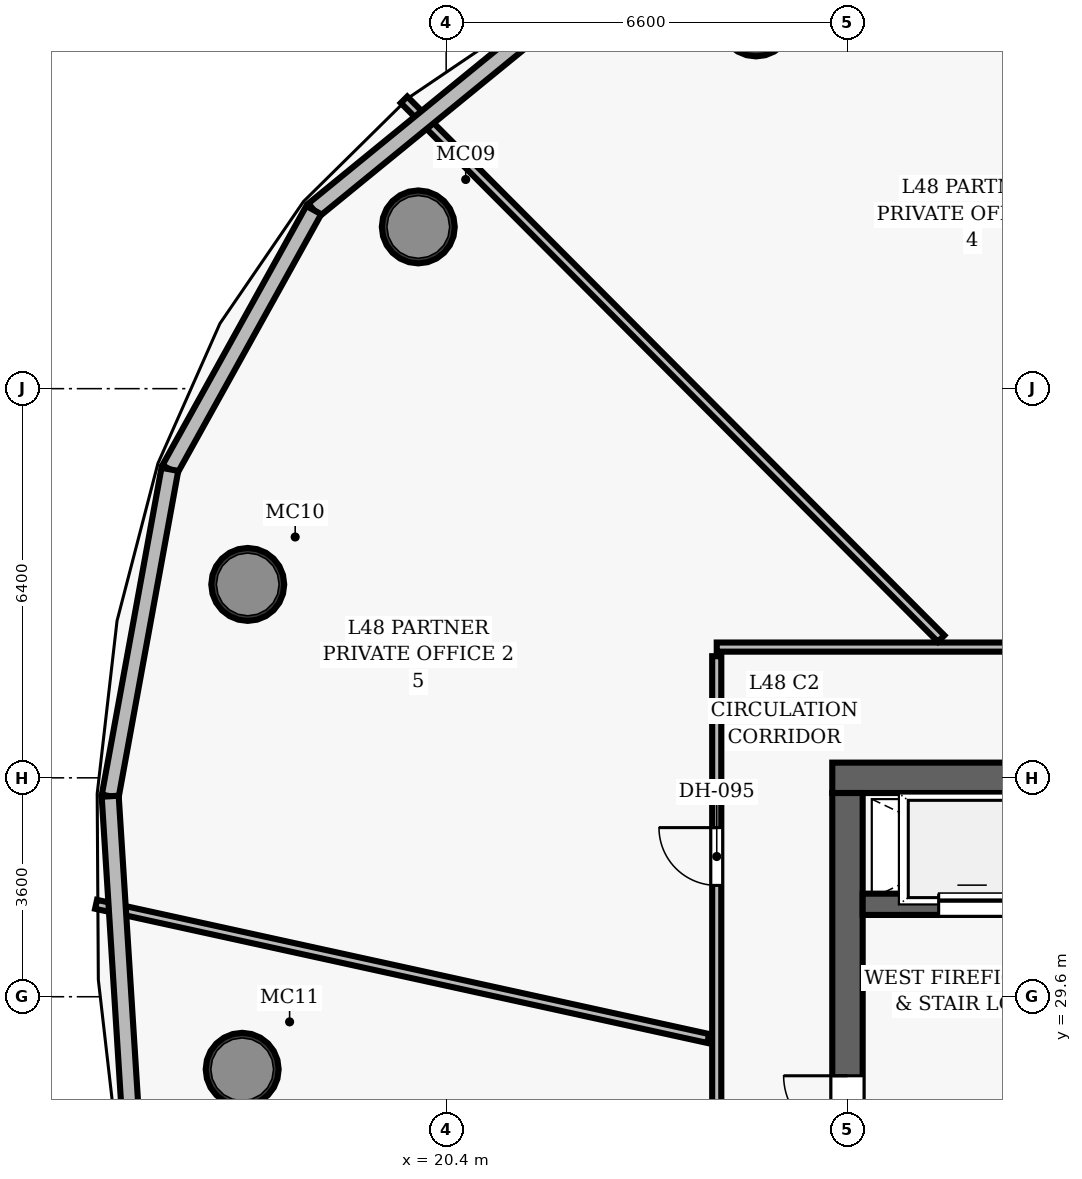
"""IFC4 building model, lengths in metres.
Left out: names, types, materials, properties, quantities, classifications, styles, units other than length and angle.
Written with IfcOpenShell. Run it as: python <this file> out.ifc"""

import sys

from ifc_helpers import new_model, si_unit, direction, frame, frame_2d, origin, origin_2d, place, context, subcontext, project, spatial, rectangle, hollow_circle, extrude, element, fill, save


model = new_model("IFC4")
c1 = context("Model", 3, precision=1e-05, world=origin(), true_north=direction((0.0, 1.0)))
c2 = subcontext(c1, "Body", "Model", "MODEL_VIEW")
j1 = project(units=[si_unit("LENGTHUNIT", "METRE"), si_unit("PLANEANGLEUNIT", "RADIAN")], contexts=[c1])
p1 = place(None, origin())
s1 = spatial("IfcSite", under=j1, at=p1, CompositionType="ELEMENT")
p2 = place(p1, origin())
s2 = spatial("IfcBuilding", under=s1, at=p2, CompositionType="ELEMENT")
p3 = place(p2, frame((0.0, 0.0, 190.45)))
s3 = spatial("IfcBuildingStorey", under=s2, at=p3, CompositionType="ELEMENT", Elevation=190.45)
p4 = place(p3, frame((26.75, 33.2, 0.0), z_axis=(0.0, 0.0, 1.0), x_axis=(1.0, 0.0, 0.0)))
e1 = element("IfcWall", 1, at=p4, inside=s3, PredefinedType="SHEAR", context=c2, shape_type="SweptSolid", body=[
    extrude(rectangle(XDim=22.5, YDim=0.5, at=frame_2d((11.25, 0.0))), origin(), (0.0, 0.0, 1.0), 3.85),
])
p5 = place(p4, frame((4.57, 0.0, 0.0)))
e2 = element("IfcOpeningElement", 2, at=p5, cuts=e1, PredefinedType="OPENING", context=c2, shape_type="SweptSolid", body=[
    extrude(rectangle(XDim=1.05, YDim=2.15, at=frame_2d((0.525, 1.075))), frame((0.0, 0.26, 0.0), z_axis=(0.0, -1.0, 0.0), x_axis=(1.0, 0.0, 0.0)), (0.0, 0.0, 1.0), 0.52),
])
p6 = place(p4, frame((14.47, 0.0, 0.0)))
e3 = element("IfcOpeningElement", 3, at=p6, cuts=e1, PredefinedType="OPENING", context=c2, shape_type="SweptSolid", body=[
    extrude(rectangle(XDim=1.05, YDim=2.15, at=frame_2d((0.525, 1.075))), frame((0.0, 0.26, 0.0), z_axis=(0.0, -1.0, 0.0), x_axis=(1.0, 0.0, 0.0)), (0.0, 0.0, 1.0), 0.52),
])
p7 = place(p3, frame((27.0, 19.05, 0.0), z_axis=(0.0, 0.0, 1.0), x_axis=(0.0, 1.0, 0.0)))
e4 = element("IfcWall", 4, at=p7, inside=s3, PredefinedType="SHEAR", context=c2, shape_type="SweptSolid", body=[
    extrude(rectangle(XDim=13.9, YDim=0.5, at=frame_2d((6.95, 0.0))), origin(), (0.0, 0.0, 1.0), 3.85),
])
p8 = place(p7, frame((8.2, 0.0, 0.0)))
e5 = element("IfcOpeningElement", 5, at=p8, cuts=e4, PredefinedType="OPENING", context=c2, shape_type="SweptSolid", body=[
    extrude(rectangle(XDim=1.05, YDim=2.15, at=frame_2d((0.525, 1.075))), frame((0.0, 0.26, 0.0), z_axis=(0.0, -1.0, 0.0), x_axis=(1.0, 0.0, 0.0)), (0.0, 0.0, 1.0), 0.52),
])
for number, where, z_axis, x_axis in (
    (6, (25.496, 45.664, 0.0), (0.0, 0.0, 1.0), (1.0, 0.0, 0.0)),
    (7, (19.942, 42.26, 0.0), (0.0, 0.0, 1.0), (1.0, 0.0, 0.0)),
    (8, (17.137, 36.381, 0.0), (0.0, 0.0, 1.0), (1.0, 0.0, 0.0)),
    (9, (17.045, 28.406, 0.0), (0.0, 0.0, 1.0), (1.0, 0.0, 0.0)),
):
    element("IfcColumn", number, at=place(p3, frame(where, z_axis=z_axis, x_axis=x_axis)), inside=s3, PredefinedType="COLUMN", context=c2, shape_type="SweptSolid", body=[
        extrude(hollow_circle(Radius=0.6, WallThickness=0.05, at=origin_2d()), origin(), (0.0, 0.0, 1.0), 3.85),
    ])
p9 = place(p3, frame((27.25, 31.12, 0.0), z_axis=(0.0, 0.0, 1.0), x_axis=(1.0, 0.0, 0.0)))
e10 = element("IfcWall", 10, at=p9, inside=s3, PredefinedType="SHEAR", context=c2, shape_type="SweptSolid", body=[
    extrude(rectangle(XDim=3.67, YDim=0.35, at=frame_2d((1.835, 0.0))), origin(), (0.0, 0.0, 1.0), 3.035),
])
p10 = place(p9, frame((1.25, 0.0, 0.0)))
e11 = element("IfcOpeningElement", 11, at=p10, cuts=e10, PredefinedType="OPENING", context=c2, shape_type="SweptSolid", body=[
    extrude(rectangle(XDim=1.1, YDim=2.15, at=frame_2d((0.55, 1.075))), frame((0.0, 0.185, 0.0), z_axis=(0.0, -1.0, 0.0), x_axis=(1.0, 0.0, 0.0)), (0.0, 0.0, 1.0), 0.37),
])
p11 = place(p3, frame((24.85, 35.35, 0.0), z_axis=(0.0, 0.0, 1.0), x_axis=(1.0, 0.0, 0.0)))
e12 = element("IfcWall", 12, at=p11, inside=s3, PredefinedType="PARTITIONING", context=c2, shape_type="SweptSolid", body=[
    extrude(rectangle(XDim=26.0, YDim=0.15, at=frame_2d((13.0, 0.0))), origin(), (0.0, 0.0, 1.0), 3.035),
])
p12 = place(p11, frame((18.327, 0.0, 0.0)))
e13 = element("IfcOpeningElement", 13, at=p12, cuts=e12, PredefinedType="OPENING", context=c2, shape_type="SweptSolid", body=[
    extrude(rectangle(XDim=0.95, YDim=2.15, at=frame_2d((0.475, 1.075))), frame((0.0, 0.085, 0.0), z_axis=(0.0, -1.0, 0.0), x_axis=(1.0, 0.0, 0.0)), (0.0, 0.0, 1.0), 0.17),
])
p13 = place(p11, frame((11.881, 0.0, 0.0)))
e14 = element("IfcOpeningElement", 14, at=p13, cuts=e12, PredefinedType="OPENING", context=c2, shape_type="SweptSolid", body=[
    extrude(rectangle(XDim=0.95, YDim=2.15, at=frame_2d((0.475, 1.075))), frame((0.0, 0.085, 0.0), z_axis=(0.0, -1.0, 0.0), x_axis=(1.0, 0.0, 0.0)), (0.0, 0.0, 1.0), 0.17),
])
p14 = place(p11, frame((5.711, 0.0, 0.0)))
e15 = element("IfcOpeningElement", 15, at=p14, cuts=e12, PredefinedType="OPENING", context=c2, shape_type="SweptSolid", body=[
    extrude(rectangle(XDim=0.95, YDim=2.15, at=frame_2d((0.475, 1.075))), frame((0.0, 0.085, 0.0), z_axis=(0.0, -1.0, 0.0), x_axis=(1.0, 0.0, 0.0)), (0.0, 0.0, 1.0), 0.17),
])
p15 = place(p3, frame((24.85, 27.08, 0.0), z_axis=(0.0, 0.0, 1.0), x_axis=(0.0, 1.0, 0.0)))
e16 = element("IfcWall", 16, at=p15, inside=s3, PredefinedType="PARTITIONING", context=c2, shape_type="SweptSolid", body=[
    extrude(rectangle(XDim=8.12, YDim=0.15, at=frame_2d((4.06, 0.0))), origin(), (0.0, 0.0, 1.0), 3.035),
])
p16 = place(p15, frame((4.351, 0.0, 0.0)))
e17 = element("IfcOpeningElement", 17, at=p16, cuts=e16, PredefinedType="OPENING", context=c2, shape_type="SweptSolid", body=[
    extrude(rectangle(XDim=0.95, YDim=2.15, at=frame_2d((0.475, 1.075))), frame((0.0, 0.085, 0.0), z_axis=(0.0, -1.0, 0.0), x_axis=(1.0, 0.0, 0.0)), (0.0, 0.0, 1.0), 0.17),
])
p17 = place(p3, frame((28.54, 35.49, 0.0), z_axis=(0.0, 0.0, 1.0), x_axis=(-0.705983856865, 0.708227925068, 0.0)))
e18 = element("IfcWall", 18, at=p17, inside=s3, PredefinedType="PARTITIONING", context=c2, shape_type="SweptSolid", body=[
    extrude(rectangle(XDim=12.511, YDim=0.15, at=frame_2d((6.256, 0.0))), origin(), (0.0, 0.0, 1.0), 3.035),
])
p18 = place(p3, frame((24.71, 28.913, 0.0), z_axis=(0.0, 0.0, 1.0), x_axis=(-0.97680395447, 0.214135551772, 0.0)))
e19 = element("IfcWall", 19, at=p18, inside=s3, PredefinedType="PARTITIONING", context=c2, shape_type="SweptSolid", body=[
    extrude(rectangle(XDim=10.307, YDim=0.15, at=frame_2d((5.153, 0.0))), origin(), (0.0, 0.0, 1.0), 3.035),
])
p19 = place(p3, frame((18.222, 42.537, 0.0), z_axis=(0.0, 0.0, 1.0), x_axis=(0.77459712555, 0.632454973172, 0.0)))
e20 = element("IfcWall", 20, at=p19, inside=s3, PredefinedType="SOLIDWALL", context=c2, shape_type="SweptSolid", body=[
    extrude(rectangle(XDim=4.876, YDim=0.28, at=frame_2d((2.438, 0.0))), origin(), (0.0, 0.0, 1.0), 3.62),
])
p20 = place(p3, frame((15.856, 38.273, 0.0), z_axis=(0.0, 0.0, 1.0), x_axis=(0.485290067778, 0.874353218165, 0.0)))
e21 = element("IfcWall", 21, at=p20, inside=s3, PredefinedType="SOLIDWALL", context=c2, shape_type="SweptSolid", body=[
    extrude(rectangle(XDim=4.876, YDim=0.28, at=frame_2d((2.438, 0.0))), origin(), (0.0, 0.0, 1.0), 3.62),
])
p21 = place(p3, frame((14.875, 32.897, 0.0), z_axis=(0.0, 0.0, 1.0), x_axis=(0.179608829185, 0.983738109701, 0.0)))
e22 = element("IfcWall", 22, at=p21, inside=s3, PredefinedType="SOLIDWALL", context=c2, shape_type="SweptSolid", body=[
    extrude(rectangle(XDim=5.464, YDim=0.28, at=frame_2d((2.732, 0.0))), origin(), (0.0, 0.0, 1.0), 3.62),
])
p22 = place(p3, frame((15.268, 26.683, 0.0), z_axis=(0.0, 0.0, 1.0), x_axis=(-0.063166731374, 0.998002987995, 0.0)))
e23 = element("IfcWall", 23, at=p22, inside=s3, PredefinedType="SOLIDWALL", context=c2, shape_type="SweptSolid", body=[
    extrude(rectangle(XDim=6.227, YDim=0.28, at=frame_2d((3.113, 0.0))), origin(), (0.0, 0.0, 1.0), 3.62),
])
p23 = place(p8, origin())
e24 = element("IfcDoor", 24, at=p23, inside=s3, OperationType="SINGLE_SWING_RIGHT", PredefinedType="DOOR", context=c2, shape_type="SweptSolid", body=[
    extrude(rectangle(XDim=1.05, YDim=2.15, at=frame_2d((0.525, 1.075))), frame((0.0, 0.025, 0.0), z_axis=(0.0, -1.0, 0.0), x_axis=(1.0, 0.0, 0.0)), (0.0, 0.0, 1.0), 0.05),
])
fill(e5, e24)
p24 = place(p16, origin())
e25 = element("IfcDoor", 25, at=p24, inside=s3, OperationType="SINGLE_SWING_RIGHT", PredefinedType="DOOR", context=c2, shape_type="SweptSolid", body=[
    extrude(rectangle(XDim=0.95, YDim=2.15, at=frame_2d((0.475, 1.075))), frame((0.0, 0.025, 0.0), z_axis=(0.0, -1.0, 0.0), x_axis=(1.0, 0.0, 0.0)), (0.0, 0.0, 1.0), 0.05),
])
fill(e17, e25)
p25 = place(p10, origin())
e26 = element("IfcDoor", 26, at=p25, inside=s3, OperationType="SLIDING_TO_LEFT", PredefinedType="DOOR", context=c2, shape_type="SweptSolid", body=[
    extrude(rectangle(XDim=1.1, YDim=2.15, at=frame_2d((0.55, 1.075))), frame((0.0, 0.025, 0.0), z_axis=(0.0, -1.0, 0.0), x_axis=(1.0, 0.0, 0.0)), (0.0, 0.0, 1.0), 0.05),
])
fill(e11, e26)
save(model, sys.argv[1])
